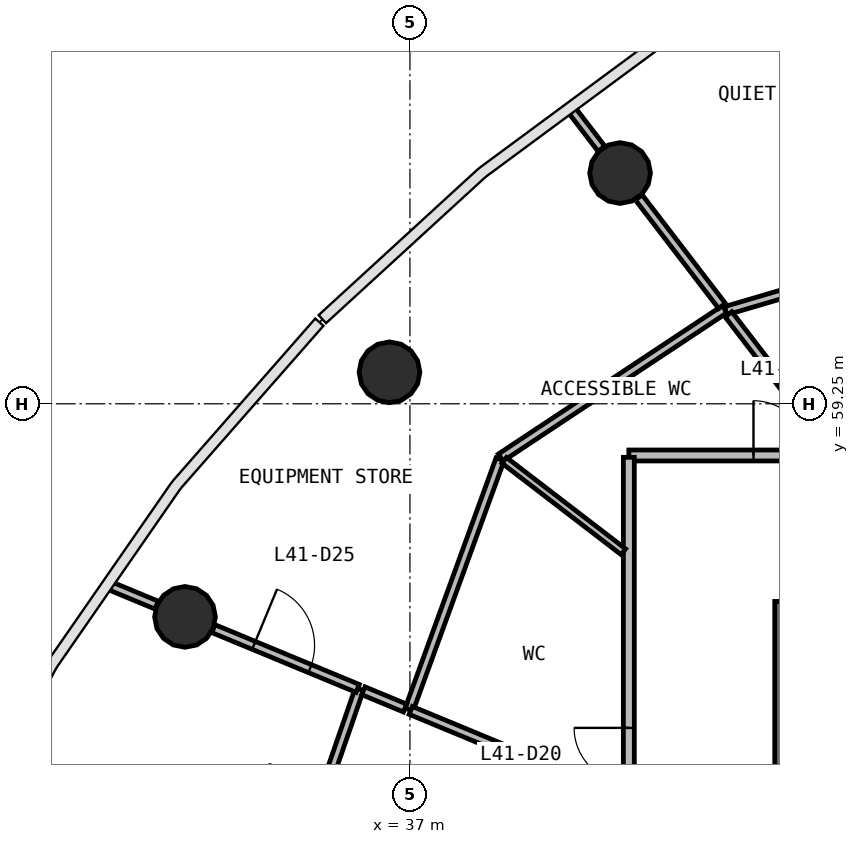
"""IFC4 building model, lengths in metres.
Left out: names, types, materials, properties, quantities, classifications, styles, units other than length and angle.
Written with IfcOpenShell. Run it as: python <this file> out.ifc"""

import sys

from ifc_helpers import new_model, si_unit, direction, frame, frame_2d, origin, origin_2d, place, context, subcontext, project, spatial, rectangle, circle, extrude, source, transform, mapped, element, fill, save


model = new_model("IFC4")
c1 = context("Model", 3, precision=1e-05, world=origin(), true_north=direction((0.0, 1.0)))
c2 = subcontext(c1, "Body", "Model", "MODEL_VIEW")
j1 = project(units=[si_unit("LENGTHUNIT", "METRE"), si_unit("PLANEANGLEUNIT", "RADIAN")], contexts=[c1])
p1 = place(None, origin())
s1 = spatial("IfcSite", under=j1, at=p1, CompositionType="ELEMENT")
p2 = place(p1, origin())
s2 = spatial("IfcBuilding", under=s1, at=p2, CompositionType="ELEMENT")
p3 = place(p2, frame((0.0, 0.0, 172.1)))
s3 = spatial("IfcBuildingStorey", under=s2, at=p3, CompositionType="ELEMENT", Elevation=172.1)
p4 = place(p3, frame((43.4, 56.0, 0.0), z_axis=(0.0, 0.0, 1.0), x_axis=(0.0, -1.0, 0.0)))
e1 = element("IfcWall", 1, at=p4, inside=s3, PredefinedType="SHEAR", context=c2, shape_type="SweptSolid", body=[
    extrude(rectangle(XDim=16.0, YDim=0.8, at=frame_2d((8.0, 0.0))), origin(), (0.0, 0.0, 1.0), 3.9),
])
p5 = place(p4, frame((7.1, 0.0, 0.0)))
e2 = element("IfcOpeningElement", 2, at=p5, cuts=e1, PredefinedType="OPENING", context=c2, shape_type="SweptSolid", body=[
    extrude(rectangle(XDim=1.8, YDim=2.1, at=frame_2d((0.9, 1.05))), frame((0.0, 0.41, 0.0), z_axis=(0.0, -1.0, 0.0), x_axis=(1.0, 0.0, 0.0)), (0.0, 0.0, 1.0), 0.82),
])
m1 = source(origin(), c2, "Body", "SweptSolid", [
    extrude(circle(Radius=0.5, at=origin_2d()), origin(), (0.0, 0.0, 1.0), 3.9),
])
for number, where, z_axis, x_axis in (
    (3, (40.456, 63.044, 0.0), (0.0, 0.0, 1.0), (1.0, 0.0, 0.0)),
    (4, (36.664, 59.768, 0.0), (0.0, 0.0, 1.0), (1.0, 0.0, 0.0)),
    (5, (33.301, 55.746, 0.0), (0.0, 0.0, 1.0), (1.0, 0.0, 0.0)),
):
    element("IfcColumn", number, at=place(p3, frame(where, z_axis=z_axis, x_axis=x_axis)), inside=s3, PredefinedType="COLUMN", context=c2, shape_type="MappedRepresentation", body=[
        mapped(m1, transform((0.0, 0.0, 0.0), scale=1.0)),
    ])
p6 = place(p3, frame((40.6, 58.4, 0.0), z_axis=(0.0, 0.0, 1.0), x_axis=(1.0, 0.0, 0.0)))
e6 = element("IfcWall", 6, at=p6, inside=s3, PredefinedType="PARTITIONING", context=c2, shape_type="SweptSolid", body=[
    extrude(rectangle(XDim=22.8, YDim=0.18, at=frame_2d((11.4, 0.0))), origin(), (0.0, 0.0, 1.0), 2.88),
])
p7 = place(p6, frame((2.05, 0.0, 0.0)))
e7 = element("IfcOpeningElement", 7, at=p7, cuts=e6, PredefinedType="OPENING", context=c2, shape_type="SweptSolid", body=[
    extrude(rectangle(XDim=0.9, YDim=2.1, at=frame_2d((0.45, 1.05))), frame((0.0, 0.1, 0.0), z_axis=(0.0, -1.0, 0.0), x_axis=(1.0, 0.0, 0.0)), (0.0, 0.0, 1.0), 0.2),
])
p8 = place(p6, frame((16.15, 0.0, 0.0)))
e8 = element("IfcOpeningElement", 8, at=p8, cuts=e6, PredefinedType="OPENING", context=c2, shape_type="SweptSolid", body=[
    extrude(rectangle(XDim=1.0, YDim=2.1, at=frame_2d((0.5, 1.05))), frame((0.0, 0.1, 0.0), z_axis=(0.0, -1.0, 0.0), x_axis=(1.0, 0.0, 0.0)), (0.0, 0.0, 1.0), 0.2),
])
p9 = place(p6, frame((10.95, 0.0, 0.0)))
e9 = element("IfcOpeningElement", 9, at=p9, cuts=e6, PredefinedType="OPENING", context=c2, shape_type="SweptSolid", body=[
    extrude(rectangle(XDim=1.0, YDim=2.1, at=frame_2d((0.5, 1.05))), frame((0.0, 0.1, 0.0), z_axis=(0.0, -1.0, 0.0), x_axis=(1.0, 0.0, 0.0)), (0.0, 0.0, 1.0), 0.2),
])
p10 = place(p6, frame((8.75, 0.0, 0.0)))
e10 = element("IfcOpeningElement", 10, at=p10, cuts=e6, PredefinedType="OPENING", context=c2, shape_type="SweptSolid", body=[
    extrude(rectangle(XDim=1.0, YDim=2.1, at=frame_2d((0.5, 1.05))), frame((0.0, 0.1, 0.0), z_axis=(0.0, -1.0, 0.0), x_axis=(1.0, 0.0, 0.0)), (0.0, 0.0, 1.0), 0.2),
])
p11 = place(p3, frame((40.6, 37.63, 0.0), z_axis=(0.0, 0.0, 1.0), x_axis=(0.0, 1.0, 0.0)))
e11 = element("IfcWall", 11, at=p11, inside=s3, PredefinedType="PARTITIONING", context=c2, shape_type="SweptSolid", body=[
    extrude(rectangle(XDim=20.74, YDim=0.18, at=frame_2d((10.37, 0.0))), origin(), (0.0, 0.0, 1.0), 2.88),
])
p12 = place(p11, frame((15.39, 0.0, 0.0)))
e12 = element("IfcOpeningElement", 12, at=p12, cuts=e11, PredefinedType="OPENING", context=c2, shape_type="SweptSolid", body=[
    extrude(rectangle(XDim=0.9, YDim=2.1, at=frame_2d((0.45, 1.05))), frame((0.0, 0.1, 0.0), z_axis=(0.0, -1.0, 0.0), x_axis=(1.0, 0.0, 0.0)), (0.0, 0.0, 1.0), 0.2),
])
p13 = place(p11, frame((9.89, 0.0, 0.0)))
e13 = element("IfcOpeningElement", 13, at=p13, cuts=e11, PredefinedType="OPENING", context=c2, shape_type="SweptSolid", body=[
    extrude(rectangle(XDim=1.0, YDim=2.1, at=frame_2d((0.5, 1.05))), frame((0.0, 0.1, 0.0), z_axis=(0.0, -1.0, 0.0), x_axis=(1.0, 0.0, 0.0)), (0.0, 0.0, 1.0), 0.2),
])
p14 = place(p3, frame((34.697, 50.308, 0.0), z_axis=(0.0, 0.0, 1.0), x_axis=(0.327118021709, 0.944983491852, 0.0)))
e14 = element("IfcWall", 14, at=p14, inside=s3, PredefinedType="PARTITIONING", context=c2, shape_type="SweptSolid", body=[
    extrude(rectangle(XDim=4.497, YDim=0.14, at=frame_2d((2.249, 0.0))), origin(), (0.0, 0.0, 1.0), 2.88),
])
p15 = place(p14, frame((1.847, 0.0, 0.0)))
e15 = element("IfcOpeningElement", 15, at=p15, cuts=e14, PredefinedType="OPENING", context=c2, shape_type="SweptSolid", body=[
    extrude(rectangle(XDim=1.0, YDim=2.1, at=frame_2d((0.5, 1.05))), frame((0.0, 0.08, 0.0), z_axis=(0.0, -1.0, 0.0), x_axis=(1.0, 0.0, 0.0)), (0.0, 0.0, 1.0), 0.16),
])
p16 = place(p3, frame((42.175, 60.804, 0.0), z_axis=(0.0, 0.0, 1.0), x_axis=(-0.833696109899, -0.552223502162, 0.0)))
e16 = element("IfcWall", 16, at=p16, inside=s3, PredefinedType="PARTITIONING", context=c2, shape_type="SweptSolid", body=[
    extrude(rectangle(XDim=4.417, YDim=0.14, at=frame_2d((2.209, 0.0))), origin(), (0.0, 0.0, 1.0), 2.88),
])
p17 = place(p3, frame((38.482, 58.337, 0.0), z_axis=(0.0, 0.0, 1.0), x_axis=(-0.341774383975, -0.939782033484, 0.0)))
e17 = element("IfcWall", 17, at=p17, inside=s3, PredefinedType="PARTITIONING", context=c2, shape_type="SweptSolid", body=[
    extrude(rectangle(XDim=4.381, YDim=0.14, at=frame_2d((2.19, 0.0))), origin(), (0.0, 0.0, 1.0), 2.88),
])
p18 = place(p3, frame((42.193, 60.781, 0.0), z_axis=(0.0, 0.0, 1.0), x_axis=(0.959388676041, 0.282087518838, 0.0)))
e18 = element("IfcWall", 18, at=p18, inside=s3, PredefinedType="PARTITIONING", context=c2, shape_type="SweptSolid", body=[
    extrude(rectangle(XDim=4.193, YDim=0.14, at=frame_2d((2.097, 0.0))), origin(), (0.0, 0.0, 1.0), 2.88),
])
p19 = place(p18, frame((1.543, 0.0, 0.0)))
e19 = element("IfcOpeningElement", 19, at=p19, cuts=e18, PredefinedType="OPENING", context=c2, shape_type="SweptSolid", body=[
    extrude(rectangle(XDim=1.0, YDim=2.1, at=frame_2d((0.5, 1.05))), frame((0.0, 0.08, 0.0), z_axis=(0.0, -1.0, 0.0), x_axis=(1.0, 0.0, 0.0)), (0.0, 0.0, 1.0), 0.16),
])
p20 = place(p3, frame((40.51, 52.759, 0.0), z_axis=(0.0, 0.0, 1.0), x_axis=(-0.923870623115, 0.382704940842, 0.0)))
e20 = element("IfcWall", 20, at=p20, inside=s3, PredefinedType="PARTITIONING", context=c2, shape_type="SweptSolid", body=[
    extrude(rectangle(XDim=3.785, YDim=0.14, at=frame_2d((1.893, 0.0))), origin(), (0.0, 0.0, 1.0), 2.88),
])
p21 = place(p3, frame((43.951, 58.49, 0.0), z_axis=(0.0, 0.0, 1.0), x_axis=(-0.608715851353, 0.793388311177, 0.0)))
e21 = element("IfcWall", 21, at=p21, inside=s3, PredefinedType="PARTITIONING", context=c2, shape_type="SweptSolid", body=[
    extrude(rectangle(XDim=2.812, YDim=0.14, at=frame_2d((1.406, 0.0))), origin(), (0.0, 0.0, 1.0), 2.88),
])
p22 = place(p3, frame((33.767, 55.552, 0.0), z_axis=(0.0, 0.0, 1.0), x_axis=(0.923865084747, -0.38271831049, 0.0)))
e22 = element("IfcWall", 22, at=p22, inside=s3, PredefinedType="PARTITIONING", context=c2, shape_type="SweptSolid", body=[
    extrude(rectangle(XDim=2.569, YDim=0.14, at=frame_2d((1.284, 0.0))), origin(), (0.0, 0.0, 1.0), 2.88),
])
p23 = place(p22, frame((0.719, 0.0, 0.0)))
e23 = element("IfcOpeningElement", 23, at=p23, cuts=e22, PredefinedType="OPENING", context=c2, shape_type="SweptSolid", body=[
    extrude(rectangle(XDim=1.0, YDim=2.1, at=frame_2d((0.5, 1.05))), frame((0.0, 0.08, 0.0), z_axis=(0.0, -1.0, 0.0), x_axis=(1.0, 0.0, 0.0)), (0.0, 0.0, 1.0), 0.16),
])
p24 = place(p3, frame((42.132, 60.86, 0.0), z_axis=(0.0, 0.0, 1.0), x_axis=(-0.60873458163, 0.793373940288, 0.0)))
e24 = element("IfcWall", 24, at=p24, inside=s3, PredefinedType="PARTITIONING", context=c2, shape_type="SweptSolid", body=[
    extrude(rectangle(XDim=2.249, YDim=0.14, at=frame_2d((1.125, 0.0))), origin(), (0.0, 0.0, 1.0), 2.88),
])
p25 = place(p3, frame((36.92, 54.246, 0.0), z_axis=(0.0, 0.0, 1.0), x_axis=(-0.923832744819, 0.382796368322, 0.0)))
e25 = element("IfcWall", 25, at=p25, inside=s3, PredefinedType="PARTITIONING", context=c2, shape_type="SweptSolid", body=[
    extrude(rectangle(XDim=0.744, YDim=0.14, at=frame_2d((0.372, 0.0))), origin(), (0.0, 0.0, 1.0), 2.88),
])
p26 = place(p3, frame((32.834, 55.939, 0.0), z_axis=(0.0, 0.0, 1.0), x_axis=(-0.923798714545, 0.382878485951, 0.0)))
e26 = element("IfcWall", 26, at=p26, inside=s3, PredefinedType="PARTITIONING", context=c2, shape_type="SweptSolid", body=[
    extrude(rectangle(XDim=0.819, YDim=0.14, at=frame_2d((0.409, 0.0))), origin(), (0.0, 0.0, 1.0), 2.88),
])
p27 = place(p3, frame((40.149, 63.445, 0.0), z_axis=(0.0, 0.0, 1.0), x_axis=(-0.60871867817, 0.793386142334, 0.0)))
e27 = element("IfcWall", 27, at=p27, inside=s3, PredefinedType="PARTITIONING", context=c2, shape_type="SweptSolid", body=[
    extrude(rectangle(XDim=0.785, YDim=0.14, at=frame_2d((0.393, 0.0))), origin(), (0.0, 0.0, 1.0), 2.88),
])
p28 = place(p3, frame((40.51, 56.817, 0.0), z_axis=(0.0, 0.0, 1.0), x_axis=(-0.79340260872, 0.608697215762, 0.0)))
e28 = element("IfcWall", 28, at=p28, inside=s3, PredefinedType="PARTITIONING", context=c2, shape_type="SweptSolid", body=[
    extrude(rectangle(XDim=2.469, YDim=0.12, at=frame_2d((1.234, 0.0))), origin(), (0.0, 0.0, 1.0), 2.88),
])
m2 = source(origin(), c2, "Body", "SweptSolid", [
    extrude(rectangle(XDim=0.9, YDim=2.1, at=frame_2d((0.45, 1.05))), frame((0.0, 0.025, 0.0), z_axis=(0.0, -1.0, 0.0), x_axis=(1.0, 0.0, 0.0)), (0.0, 0.0, 1.0), 0.05),
])
p29 = place(p7, origin())
e29 = element("IfcDoor", 29, at=p29, inside=s3, OperationType="SINGLE_SWING_LEFT", PredefinedType="DOOR", context=c2, shape_type="MappedRepresentation", body=[
    mapped(m2, transform((0.0, 0.0, 0.0), scale=1.0)),
])
fill(e7, e29)
p30 = place(p12, origin())
e30 = element("IfcDoor", 30, at=p30, inside=s3, OperationType="SINGLE_SWING_RIGHT", PredefinedType="DOOR", context=c2, shape_type="MappedRepresentation", body=[
    mapped(m2, transform((0.0, 0.0, 0.0), scale=1.0)),
])
fill(e12, e30)
m3 = source(origin(), c2, "Body", "SweptSolid", [
    extrude(rectangle(XDim=1.0, YDim=2.1, at=frame_2d((0.5, 1.05))), frame((0.0, 0.025, 0.0), z_axis=(0.0, -1.0, 0.0), x_axis=(1.0, 0.0, 0.0)), (0.0, 0.0, 1.0), 0.05),
])
p31 = place(p23, origin())
e31 = element("IfcDoor", 31, at=p31, inside=s3, OperationType="SINGLE_SWING_LEFT", PredefinedType="DOOR", context=c2, shape_type="MappedRepresentation", body=[
    mapped(m3, transform((0.0, 0.0, 0.0), scale=1.0)),
])
fill(e23, e31)
save(model, sys.argv[1])
